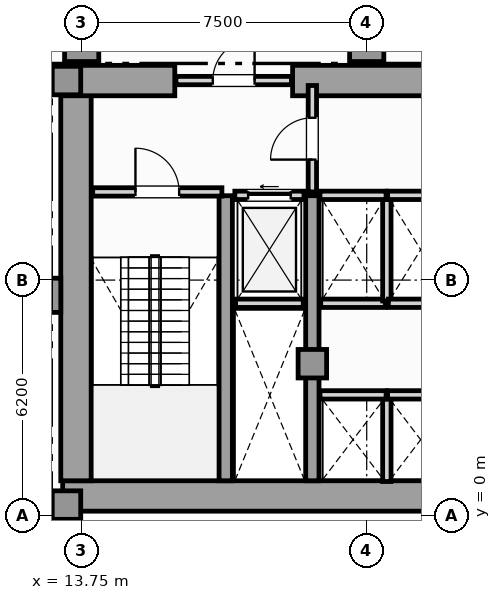
"""IFC4 building model, lengths in metres.
Left out: names, types, materials, properties, quantities, classifications, styles, units other than length and angle.
Written with IfcOpenShell. Run it as: python <this file> out.ifc"""

import sys

from ifc_helpers import new_model, si_unit, direction, frame, frame_2d, origin, origin_2d, place, context, subcontext, project, spatial, rectangle, extrude, element, fill, save


model = new_model("IFC4")
c1 = context("Model", 3, precision=1e-05, world=origin(), true_north=direction((0.0, 1.0)))
c2 = subcontext(c1, "Body", "Model", "MODEL_VIEW")
j1 = project(units=[si_unit("LENGTHUNIT", "METRE"), si_unit("PLANEANGLEUNIT", "RADIAN")], contexts=[c1])
p1 = place(None, origin())
s1 = spatial("IfcSite", under=j1, at=p1, CompositionType="ELEMENT")
p2 = place(p1, origin())
s2 = spatial("IfcBuilding", under=s1, at=p2, CompositionType="ELEMENT")
p3 = place(p2, frame((0.0, 0.0, 5.4)))
s3 = spatial("IfcBuildingStorey", under=s2, at=p3, CompositionType="ELEMENT", Elevation=5.4)
p4 = place(p3, frame((13.25, 0.52, 0.0), z_axis=(0.0, 0.0, 1.0), x_axis=(1.0, 0.0, 0.0)))
e1 = element("IfcWall", 1, at=p4, inside=s3, PredefinedType="SHEAR", context=c2, shape_type="SweptSolid", body=[
    extrude(rectangle(XDim=31.0, YDim=0.8, at=frame_2d((15.5, 0.0))), origin(), (0.0, 0.0, 1.0), 4.5),
])
p5 = place(p3, frame((13.6, 0.92, 0.0), z_axis=(0.0, 0.0, 1.0), x_axis=(0.0, 1.0, 0.0)))
e2 = element("IfcWall", 2, at=p5, inside=s3, PredefinedType="SHEAR", context=c2, shape_type="SweptSolid", body=[
    extrude(rectangle(XDim=10.53, YDim=0.8, at=frame_2d((5.265, 0.0))), origin(), (0.0, 0.0, 1.0), 4.5),
])
p6 = place(p3, frame((13.25, 11.45, 0.0), z_axis=(0.0, 0.0, 1.0), x_axis=(1.0, 0.0, 0.0)))
e3 = element("IfcWall", 3, at=p6, inside=s3, PredefinedType="SHEAR", context=c2, shape_type="SweptSolid", body=[
    extrude(rectangle(XDim=2.95, YDim=0.8, at=frame_2d((1.475, 0.0))), origin(), (0.0, 0.0, 1.0), 4.5),
])
p7 = place(p3, frame((19.3, 11.45, 0.0), z_axis=(0.0, 0.0, 1.0), x_axis=(1.0, 0.0, 0.0)))
e4 = element("IfcWall", 4, at=p7, inside=s3, PredefinedType="SHEAR", context=c2, shape_type="SweptSolid", body=[
    extrude(rectangle(XDim=7.3, YDim=0.8, at=frame_2d((3.65, 0.0))), origin(), (0.0, 0.0, 1.0), 4.5),
])
for number, where, z_axis, x_axis in (
    (5, (17.54, 0.92, 0.0), (0.0, 0.0, 1.0), (0.0, 1.0, 0.0)),
    (6, (19.82, 0.92, 0.0), (0.0, 0.0, 1.0), (0.0, 1.0, 0.0)),
):
    element("IfcWall", number, at=place(p3, frame(where, z_axis=z_axis, x_axis=x_axis)), inside=s3, PredefinedType="SHEAR", context=c2, shape_type="SweptSolid", body=[
        extrude(rectangle(XDim=7.5, YDim=0.35, at=frame_2d((3.75, 0.0))), origin(), (0.0, 0.0, 1.0), 4.5),
    ])
p8 = place(p3, frame((12.9, 5.8, 0.0), z_axis=(0.0, 0.0, 1.0), x_axis=(1.0, 0.0, 0.0)))
e7 = element("IfcColumn", 7, at=p8, inside=s3, PredefinedType="PILASTER", context=c2, shape_type="SweptSolid", body=[
    extrude(rectangle(XDim=0.6, YDim=0.9, at=origin_2d()), origin(), (0.0, 0.0, 1.0), 4.8),
])
for number, where, z_axis, x_axis in (
    (8, (13.35, 0.28, 0.0), (0.0, 0.0, 1.0), (1.0, 0.0, 0.0)),
    (9, (13.35, 11.45, 0.0), (0.0, 0.0, 1.0), (1.0, 0.0, 0.0)),
    (10, (19.82, 4.0, 0.0), (0.0, 0.0, 1.0), (1.0, 0.0, 0.0)),
):
    element("IfcColumn", number, at=place(p3, frame(where, z_axis=z_axis, x_axis=x_axis)), inside=s3, PredefinedType="COLUMN", context=c2, shape_type="SweptSolid", body=[
        extrude(rectangle(XDim=0.75, YDim=0.75, at=origin_2d()), origin(), (0.0, 0.0, 1.0), 4.8),
    ])
for number, where, z_axis, x_axis in (
    (11, (13.75, 12.4, 0.0), (0.0, 0.0, 1.0), (1.0, 0.0, 0.0)),
    (12, (21.25, 12.4, 0.0), (0.0, 0.0, 1.0), (1.0, 0.0, 0.0)),
):
    element("IfcColumn", number, at=place(p3, frame(where, z_axis=z_axis, x_axis=x_axis)), inside=s3, PredefinedType="COLUMN", context=c2, shape_type="SweptSolid", body=[
        extrude(rectangle(XDim=0.9, YDim=0.9, at=origin_2d()), origin(), (0.0, 0.0, 1.0), 4.8),
    ])
p9 = place(p3, frame((17.8, 5.59, 0.0), z_axis=(0.0, 0.0, 1.0), x_axis=(1.0, 0.0, 0.0)))
e13 = element("IfcWall", 13, at=p9, inside=s3, PredefinedType="SOLIDWALL", context=c2, shape_type="SweptSolid", body=[
    extrude(rectangle(XDim=1.78, YDim=0.22, at=frame_2d((0.89, 0.0))), origin(), (0.0, 0.0, 1.0), 4.5),
])
p10 = place(p3, frame((17.78, 8.43, 0.0), z_axis=(0.0, 0.0, 1.0), x_axis=(1.0, 0.0, 0.0)))
e14 = element("IfcWall", 14, at=p10, inside=s3, PredefinedType="SOLIDWALL", context=c2, shape_type="SweptSolid", body=[
    extrude(rectangle(XDim=1.82, YDim=0.22, at=frame_2d((0.91, 0.0))), origin(), (0.0, 0.0, 1.0), 4.5),
])
p11 = place(p10, frame((0.35, 0.0, 0.0)))
e15 = element("IfcOpeningElement", 15, at=p11, cuts=e14, PredefinedType="OPENING", context=c2, shape_type="SweptSolid", body=[
    extrude(rectangle(XDim=1.12, YDim=2.25, at=frame_2d((0.56, 1.125))), frame((0.0, 0.12, 0.0), z_axis=(0.0, -1.0, 0.0), x_axis=(1.0, 0.0, 0.0)), (0.0, 0.0, 1.0), 0.24),
])
p12 = place(p3, frame((21.78, 0.9, 0.0), z_axis=(0.0, 0.0, 1.0), x_axis=(0.0, 1.0, 0.0)))
e16 = element("IfcWall", 16, at=p12, inside=s3, PredefinedType="SOLIDWALL", context=c2, shape_type="SweptSolid", body=[
    extrude(rectangle(XDim=2.2, YDim=0.22, at=frame_2d((1.1, 0.0))), origin(), (0.0, 0.0, 1.0), 4.5),
])
for number, where, z_axis, x_axis in (
    (17, (20.02, 3.18, 0.0), (0.0, 0.0, 1.0), (1.0, 0.0, 0.0)),
    (18, (21.8, 3.18, 0.0), (0.0, 0.0, 1.0), (1.0, 0.0, 0.0)),
):
    element("IfcWall", number, at=place(p3, frame(where, z_axis=z_axis, x_axis=x_axis)), inside=s3, PredefinedType="SOLIDWALL", context=c2, shape_type="SweptSolid", body=[
        extrude(rectangle(XDim=1.74, YDim=0.22, at=frame_2d((0.87, 0.0))), origin(), (0.0, 0.0, 1.0), 4.5),
    ])
p13 = place(p3, frame((20.04, 5.59, 0.0), z_axis=(0.0, 0.0, 1.0), x_axis=(1.0, 0.0, 0.0)))
e19 = element("IfcWall", 19, at=p13, inside=s3, PredefinedType="SOLIDWALL", context=c2, shape_type="SweptSolid", body=[
    extrude(rectangle(XDim=1.7, YDim=0.22, at=frame_2d((0.85, 0.0))), origin(), (0.0, 0.0, 1.0), 4.5),
])
p14 = place(p3, frame((21.78, 5.65, 0.0), z_axis=(0.0, 0.0, 1.0), x_axis=(0.0, 1.0, 0.0)))
e20 = element("IfcWall", 20, at=p14, inside=s3, PredefinedType="SOLIDWALL", context=c2, shape_type="SweptSolid", body=[
    extrude(rectangle(XDim=2.7, YDim=0.22, at=frame_2d((1.35, 0.0))), origin(), (0.0, 0.0, 1.0), 4.5),
])
p15 = place(p3, frame((20.02, 8.43, 0.0), z_axis=(0.0, 0.0, 1.0), x_axis=(1.0, 0.0, 0.0)))
e21 = element("IfcWall", 21, at=p15, inside=s3, PredefinedType="SOLIDWALL", context=c2, shape_type="SweptSolid", body=[
    extrude(rectangle(XDim=1.74, YDim=0.22, at=frame_2d((0.87, 0.0))), origin(), (0.0, 0.0, 1.0), 4.5),
])
p16 = place(p3, frame((21.82, 5.59, 0.0), z_axis=(0.0, 0.0, 1.0), x_axis=(1.0, 0.0, 0.0)))
e22 = element("IfcWall", 22, at=p16, inside=s3, PredefinedType="SOLIDWALL", context=c2, shape_type="SweptSolid", body=[
    extrude(rectangle(XDim=1.7, YDim=0.22, at=frame_2d((0.85, 0.0))), origin(), (0.0, 0.0, 1.0), 4.5),
])
p17 = place(p3, frame((21.8, 8.43, 0.0), z_axis=(0.0, 0.0, 1.0), x_axis=(1.0, 0.0, 0.0)))
e23 = element("IfcWall", 23, at=p17, inside=s3, PredefinedType="SOLIDWALL", context=c2, shape_type="SweptSolid", body=[
    extrude(rectangle(XDim=1.74, YDim=0.22, at=frame_2d((0.87, 0.0))), origin(), (0.0, 0.0, 1.0), 4.5),
])
p18 = place(p3, frame((14.04, 8.52, 0.0), z_axis=(0.0, 0.0, 1.0), x_axis=(1.0, 0.0, 0.0)))
e24 = element("IfcWall", 24, at=p18, inside=s3, PredefinedType="SOLIDWALL", context=c2, shape_type="SweptSolid", body=[
    extrude(rectangle(XDim=3.4, YDim=0.22, at=frame_2d((1.7, 0.0))), origin(), (0.0, 0.0, 1.0), 4.5),
])
p19 = place(p18, frame((1.125, 0.0, 0.0)))
e25 = element("IfcOpeningElement", 25, at=p19, cuts=e24, PredefinedType="OPENING", context=c2, shape_type="SweptSolid", body=[
    extrude(rectangle(XDim=1.15, YDim=2.2, at=frame_2d((0.575, 1.1))), frame((0.0, 0.12, 0.0), z_axis=(0.0, -1.0, 0.0), x_axis=(1.0, 0.0, 0.0)), (0.0, 0.0, 1.0), 0.24),
])
p20 = place(p3, frame((19.82, 8.52, 0.0), z_axis=(0.0, 0.0, 1.0), x_axis=(0.0, 1.0, 0.0)))
e26 = element("IfcWall", 26, at=p20, inside=s3, PredefinedType="SOLIDWALL", context=c2, shape_type="SweptSolid", body=[
    extrude(rectangle(XDim=2.8, YDim=0.22, at=frame_2d((1.4, 0.0))), origin(), (0.0, 0.0, 1.0), 3.956),
])
p21 = place(p20, frame((0.85, 0.0, 0.0)))
e27 = element("IfcOpeningElement", 27, at=p21, cuts=e26, PredefinedType="OPENING", context=c2, shape_type="SweptSolid", body=[
    extrude(rectangle(XDim=1.1, YDim=2.2, at=frame_2d((0.55, 1.1))), frame((0.0, 0.12, 0.0), z_axis=(0.0, -1.0, 0.0), x_axis=(1.0, 0.0, 0.0)), (0.0, 0.0, 1.0), 0.24),
])
p22 = place(p3, frame((16.23, 11.45, 0.0), z_axis=(0.0, 0.0, 1.0), x_axis=(1.0, 0.0, 0.0)))
e28 = element("IfcWall", 28, at=p22, inside=s3, PredefinedType="SOLIDWALL", context=c2, shape_type="SweptSolid", body=[
    extrude(rectangle(XDim=3.04, YDim=0.22, at=frame_2d((1.52, 0.0))), origin(), (0.0, 0.0, 1.0), 4.5),
])
p23 = place(p22, frame((0.97, 0.0, 0.0)))
e29 = element("IfcOpeningElement", 29, at=p23, cuts=e28, PredefinedType="OPENING", context=c2, shape_type="SweptSolid", body=[
    extrude(rectangle(XDim=1.1, YDim=2.2, at=frame_2d((0.55, 1.1))), frame((0.0, 0.12, 0.0), z_axis=(0.0, -1.0, 0.0), x_axis=(1.0, 0.0, 0.0)), (0.0, 0.0, 1.0), 0.24),
])
p24 = place(p11, origin())
e30 = element("IfcDoor", 30, at=p24, inside=s3, OperationType="SLIDING_TO_LEFT", PredefinedType="DOOR", context=c2, shape_type="SweptSolid", body=[
    extrude(rectangle(XDim=1.12, YDim=2.25, at=frame_2d((0.56, 1.125))), frame((0.0, 0.025, 0.0), z_axis=(0.0, -1.0, 0.0), x_axis=(1.0, 0.0, 0.0)), (0.0, 0.0, 1.0), 0.05),
])
fill(e15, e30)
p25 = place(p19, origin())
e31 = element("IfcDoor", 31, at=p25, inside=s3, OperationType="SINGLE_SWING_LEFT", PredefinedType="DOOR", context=c2, shape_type="SweptSolid", body=[
    extrude(rectangle(XDim=1.15, YDim=2.2, at=frame_2d((0.575, 1.1))), frame((0.0, 0.025, 0.0), z_axis=(0.0, -1.0, 0.0), x_axis=(1.0, 0.0, 0.0)), (0.0, 0.0, 1.0), 0.05),
])
fill(e25, e31)
p26 = place(p21, origin())
e32 = element("IfcDoor", 32, at=p26, inside=s3, OperationType="SINGLE_SWING_LEFT", PredefinedType="DOOR", context=c2, shape_type="SweptSolid", body=[
    extrude(rectangle(XDim=1.1, YDim=2.2, at=frame_2d((0.55, 1.1))), frame((0.0, 0.025, 0.0), z_axis=(0.0, -1.0, 0.0), x_axis=(1.0, 0.0, 0.0)), (0.0, 0.0, 1.0), 0.05),
])
fill(e27, e32)
p27 = place(p23, origin())
e33 = element("IfcDoor", 33, at=p27, inside=s3, OperationType="SINGLE_SWING_RIGHT", PredefinedType="DOOR", context=c2, shape_type="SweptSolid", body=[
    extrude(rectangle(XDim=1.1, YDim=2.2, at=frame_2d((0.55, 1.1))), frame((0.0, 0.025, 0.0), z_axis=(0.0, -1.0, 0.0), x_axis=(1.0, 0.0, 0.0)), (0.0, 0.0, 1.0), 0.05),
])
fill(e29, e33)
save(model, sys.argv[1])
